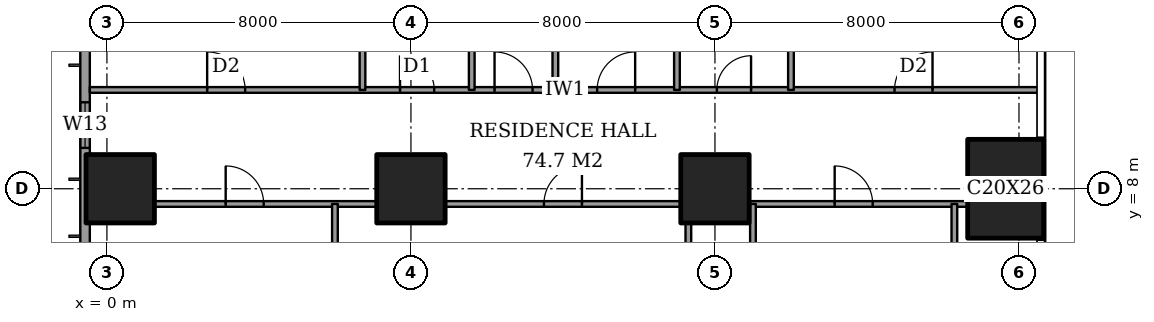
"""IFC4 building model, lengths in metres.
Left out: names, types, materials, properties, quantities, classifications, styles, units other than length and angle.
Written with IfcOpenShell. Run it as: python <this file> out.ifc"""

import sys

from ifc_helpers import new_model, si_unit, direction, frame, frame_2d, origin, origin_2d, place, context, subcontext, project, spatial, rectangle, extrude, element, fill, save


model = new_model("IFC4")
c1 = context("Model", 3, precision=1e-05, world=origin(), true_north=direction((0.0, 1.0)))
c2 = subcontext(c1, "Body", "Model", "MODEL_VIEW")
j1 = project(units=[si_unit("LENGTHUNIT", "METRE"), si_unit("PLANEANGLEUNIT", "RADIAN")], contexts=[c1])
p1 = place(None, origin())
s1 = spatial("IfcSite", under=j1, at=p1, CompositionType="ELEMENT")
p2 = place(p1, origin())
s2 = spatial("IfcBuilding", under=s1, at=p2, CompositionType="ELEMENT")
p3 = place(p2, frame((0.0, 0.0, 196.6)))
s3 = spatial("IfcBuildingStorey", under=s2, at=p3, CompositionType="ELEMENT", Elevation=196.6)
for number, where, z_axis, x_axis in (
    (1, (0.35, 8.0, 0.0), (0.0, 0.0, 1.0), (1.0, 0.0, 0.0)),
    (2, (8.0, 8.0, 0.0), (0.0, 0.0, 1.0), (1.0, 0.0, 0.0)),
    (3, (16.0, 8.0, 0.0), (0.0, 0.0, 1.0), (1.0, 0.0, 0.0)),
):
    element("IfcColumn", number, at=place(p3, frame(where, z_axis=z_axis, x_axis=x_axis)), inside=s3, PredefinedType="COLUMN", context=c2, shape_type="SweptSolid", body=[
        extrude(rectangle(XDim=1.8, YDim=1.8, at=origin_2d()), origin(), (0.0, 0.0, 1.0), 3.6),
    ])
p4 = place(p3, frame((23.65, 8.0, 0.0), z_axis=(0.0, 0.0, 1.0), x_axis=(1.0, 0.0, 0.0)))
e4 = element("IfcColumn", 4, at=p4, inside=s3, PredefinedType="COLUMN", context=c2, shape_type="SweptSolid", body=[
    extrude(rectangle(XDim=2.0, YDim=2.6, at=origin_2d()), origin(), (0.0, 0.0, 1.0), 3.6),
])
p5 = place(p3, frame((-0.575, 44.825, 0.0), z_axis=(0.0, 0.0, 1.0), x_axis=(0.0, -1.0, 0.0)))
e5 = element("IfcWall", 5, at=p5, inside=s3, PredefinedType="SOLIDWALL", context=c2, shape_type="SweptSolid", body=[
    extrude(rectangle(XDim=41.65, YDim=0.25, at=frame_2d((20.825, 0.0))), origin(), (0.0, 0.0, 1.0), 3.6),
])
p6 = place(p5, frame((0.825, 0.0, 0.2)))
e6 = element("IfcOpeningElement", 6, at=p6, cuts=e5, PredefinedType="OPENING", context=c2, shape_type="SweptSolid", body=[
    extrude(rectangle(XDim=2.4, YDim=2.4, at=frame_2d((1.2, 1.2))), frame((0.0, 0.135, 0.0), z_axis=(0.0, -1.0, 0.0), x_axis=(1.0, 0.0, 0.0)), (0.0, 0.0, 1.0), 0.27),
])
p7 = place(p5, frame((6.05, 0.0, 0.2)))
e7 = element("IfcOpeningElement", 7, at=p7, cuts=e5, PredefinedType="OPENING", context=c2, shape_type="SweptSolid", body=[
    extrude(rectangle(XDim=1.2, YDim=2.4, at=frame_2d((0.6, 1.2))), frame((0.0, 0.135, 0.0), z_axis=(0.0, -1.0, 0.0), x_axis=(1.0, 0.0, 0.0)), (0.0, 0.0, 1.0), 0.27),
])
p8 = place(p5, frame((8.225, 0.0, 0.2)))
e8 = element("IfcOpeningElement", 8, at=p8, cuts=e5, PredefinedType="OPENING", context=c2, shape_type="SweptSolid", body=[
    extrude(rectangle(XDim=2.4, YDim=2.4, at=frame_2d((1.2, 1.2))), frame((0.0, 0.135, 0.0), z_axis=(0.0, -1.0, 0.0), x_axis=(1.0, 0.0, 0.0)), (0.0, 0.0, 1.0), 0.27),
])
p9 = place(p5, frame((15.625, 0.0, 0.2)))
e9 = element("IfcOpeningElement", 9, at=p9, cuts=e5, PredefinedType="OPENING", context=c2, shape_type="SweptSolid", body=[
    extrude(rectangle(XDim=2.4, YDim=2.4, at=frame_2d((1.2, 1.2))), frame((0.0, 0.135, 0.0), z_axis=(0.0, -1.0, 0.0), x_axis=(1.0, 0.0, 0.0)), (0.0, 0.0, 1.0), 0.27),
])
p10 = place(p5, frame((23.625, 0.0, 0.2)))
e10 = element("IfcOpeningElement", 10, at=p10, cuts=e5, PredefinedType="OPENING", context=c2, shape_type="SweptSolid", body=[
    extrude(rectangle(XDim=2.4, YDim=2.4, at=frame_2d((1.2, 1.2))), frame((0.0, 0.135, 0.0), z_axis=(0.0, -1.0, 0.0), x_axis=(1.0, 0.0, 0.0)), (0.0, 0.0, 1.0), 0.27),
])
p11 = place(p5, frame((30.775, 0.0, 0.2)))
e11 = element("IfcOpeningElement", 11, at=p11, cuts=e5, PredefinedType="OPENING", context=c2, shape_type="SweptSolid", body=[
    extrude(rectangle(XDim=2.4, YDim=2.4, at=frame_2d((1.2, 1.2))), frame((0.0, 0.135, 0.0), z_axis=(0.0, -1.0, 0.0), x_axis=(1.0, 0.0, 0.0)), (0.0, 0.0, 1.0), 0.27),
])
p12 = place(p5, frame((34.55, 0.0, 0.2)))
e12 = element("IfcOpeningElement", 12, at=p12, cuts=e5, PredefinedType="OPENING", context=c2, shape_type="SweptSolid", body=[
    extrude(rectangle(XDim=1.2, YDim=2.4, at=frame_2d((0.6, 1.2))), frame((0.0, 0.135, 0.0), z_axis=(0.0, -1.0, 0.0), x_axis=(1.0, 0.0, 0.0)), (0.0, 0.0, 1.0), 0.27),
])
p13 = place(p5, frame((38.425, 0.0, 0.2)))
e13 = element("IfcOpeningElement", 13, at=p13, cuts=e5, PredefinedType="OPENING", context=c2, shape_type="SweptSolid", body=[
    extrude(rectangle(XDim=2.4, YDim=2.4, at=frame_2d((1.2, 1.2))), frame((0.0, 0.135, 0.0), z_axis=(0.0, -1.0, 0.0), x_axis=(1.0, 0.0, 0.0)), (0.0, 0.0, 1.0), 0.27),
])
p14 = place(p3, frame((1.25, 7.6, 0.0), z_axis=(0.0, 0.0, 1.0), x_axis=(1.0, 0.0, 0.0)))
e14 = element("IfcWall", 14, at=p14, inside=s3, PredefinedType="PARTITIONING", context=c2, shape_type="SweptSolid", body=[
    extrude(rectangle(XDim=5.85, YDim=0.15, at=frame_2d((2.925, 0.0))), origin(), (0.0, 0.0, 1.0), 3.35),
])
p15 = place(p14, frame((1.875, 0.0, 0.0)))
e15 = element("IfcOpeningElement", 15, at=p15, cuts=e14, PredefinedType="OPENING", context=c2, shape_type="SweptSolid", body=[
    extrude(rectangle(XDim=1.0, YDim=2.1, at=frame_2d((0.5, 1.05))), frame((0.0, 0.085, 0.0), z_axis=(0.0, -1.0, 0.0), x_axis=(1.0, 0.0, 0.0)), (0.0, 0.0, 1.0), 0.17),
])
p16 = place(p3, frame((8.9, 7.6, 0.0), z_axis=(0.0, 0.0, 1.0), x_axis=(1.0, 0.0, 0.0)))
e16 = element("IfcWall", 16, at=p16, inside=s3, PredefinedType="PARTITIONING", context=c2, shape_type="SweptSolid", body=[
    extrude(rectangle(XDim=6.2, YDim=0.15, at=frame_2d((3.1, 0.0))), origin(), (0.0, 0.0, 1.0), 3.35),
])
p17 = place(p16, frame((2.6, 0.0, 0.0)))
e17 = element("IfcOpeningElement", 17, at=p17, cuts=e16, PredefinedType="OPENING", context=c2, shape_type="SweptSolid", body=[
    extrude(rectangle(XDim=1.0, YDim=2.1, at=frame_2d((0.5, 1.05))), frame((0.0, 0.085, 0.0), z_axis=(0.0, -1.0, 0.0), x_axis=(1.0, 0.0, 0.0)), (0.0, 0.0, 1.0), 0.17),
])
p18 = place(p3, frame((16.9, 7.6, 0.0), z_axis=(0.0, 0.0, 1.0), x_axis=(1.0, 0.0, 0.0)))
e18 = element("IfcWall", 18, at=p18, inside=s3, PredefinedType="PARTITIONING", context=c2, shape_type="SweptSolid", body=[
    extrude(rectangle(XDim=5.75, YDim=0.15, at=frame_2d((2.875, 0.0))), origin(), (0.0, 0.0, 1.0), 3.35),
])
p19 = place(p18, frame((2.25, 0.0, 0.0)))
e19 = element("IfcOpeningElement", 19, at=p19, cuts=e18, PredefinedType="OPENING", context=c2, shape_type="SweptSolid", body=[
    extrude(rectangle(XDim=1.0, YDim=2.1, at=frame_2d((0.5, 1.05))), frame((0.0, 0.085, 0.0), z_axis=(0.0, -1.0, 0.0), x_axis=(1.0, 0.0, 0.0)), (0.0, 0.0, 1.0), 0.17),
])
p20 = place(p3, frame((-0.45, 10.6, 0.0), z_axis=(0.0, 0.0, 1.0), x_axis=(1.0, 0.0, 0.0)))
e20 = element("IfcWall", 20, at=p20, inside=s3, PredefinedType="PARTITIONING", context=c2, shape_type="SweptSolid", body=[
    extrude(rectangle(XDim=25.011, YDim=0.15, at=frame_2d((12.505, 0.0))), origin(), (0.0, 0.0, 1.0), 3.35),
])
p21 = place(p20, frame((10.65, 0.0, 0.0)))
e21 = element("IfcOpeningElement", 21, at=p21, cuts=e20, PredefinedType="OPENING", context=c2, shape_type="SweptSolid", body=[
    extrude(rectangle(XDim=1.0, YDim=2.1, at=frame_2d((0.5, 1.05))), frame((0.0, 0.085, 0.0), z_axis=(0.0, -1.0, 0.0), x_axis=(1.0, 0.0, 0.0)), (0.0, 0.0, 1.0), 0.17),
])
p22 = place(p20, frame((3.087, 0.0, 0.0)))
e22 = element("IfcOpeningElement", 22, at=p22, cuts=e20, PredefinedType="OPENING", context=c2, shape_type="SweptSolid", body=[
    extrude(rectangle(XDim=1.0, YDim=2.1, at=frame_2d((0.5, 1.05))), frame((0.0, 0.085, 0.0), z_axis=(0.0, -1.0, 0.0), x_axis=(1.0, 0.0, 0.0)), (0.0, 0.0, 1.0), 0.17),
])
p23 = place(p20, frame((8.163, 0.0, 0.0)))
e23 = element("IfcOpeningElement", 23, at=p23, cuts=e20, PredefinedType="OPENING", context=c2, shape_type="SweptSolid", body=[
    extrude(rectangle(XDim=0.9, YDim=2.1, at=frame_2d((0.45, 1.05))), frame((0.0, 0.085, 0.0), z_axis=(0.0, -1.0, 0.0), x_axis=(1.0, 0.0, 0.0)), (0.0, 0.0, 1.0), 0.17),
])
p24 = place(p20, frame((13.35, 0.0, 0.0)))
e24 = element("IfcOpeningElement", 24, at=p24, cuts=e20, PredefinedType="OPENING", context=c2, shape_type="SweptSolid", body=[
    extrude(rectangle(XDim=1.0, YDim=2.1, at=frame_2d((0.5, 1.05))), frame((0.0, 0.085, 0.0), z_axis=(0.0, -1.0, 0.0), x_axis=(1.0, 0.0, 0.0)), (0.0, 0.0, 1.0), 0.17),
])
p25 = place(p20, frame((16.5, 0.0, 0.0)))
e25 = element("IfcOpeningElement", 25, at=p25, cuts=e20, PredefinedType="OPENING", context=c2, shape_type="SweptSolid", body=[
    extrude(rectangle(XDim=0.9, YDim=2.1, at=frame_2d((0.45, 1.05))), frame((0.0, 0.085, 0.0), z_axis=(0.0, -1.0, 0.0), x_axis=(1.0, 0.0, 0.0)), (0.0, 0.0, 1.0), 0.17),
])
p26 = place(p20, frame((21.175, 0.0, 0.0)))
e26 = element("IfcOpeningElement", 26, at=p26, cuts=e20, PredefinedType="OPENING", context=c2, shape_type="SweptSolid", body=[
    extrude(rectangle(XDim=1.0, YDim=2.1, at=frame_2d((0.5, 1.05))), frame((0.0, 0.085, 0.0), z_axis=(0.0, -1.0, 0.0), x_axis=(1.0, 0.0, 0.0)), (0.0, 0.0, 1.0), 0.17),
])
p27 = place(p3, frame((6.0, -0.45, 0.0), z_axis=(0.0, 0.0, 1.0), x_axis=(0.0, 1.0, 0.0)))
e27 = element("IfcWall", 27, at=p27, inside=s3, PredefinedType="PARTITIONING", context=c2, shape_type="SweptSolid", body=[
    extrude(rectangle(XDim=8.05, YDim=0.15, at=frame_2d((4.025, 0.0))), origin(), (0.0, 0.0, 1.0), 3.35),
])
p28 = place(p3, frame((6.725, 10.6, 0.0), z_axis=(0.0, 0.0, 1.0), x_axis=(0.0, 1.0, 0.0)))
e28 = element("IfcWall", 28, at=p28, inside=s3, PredefinedType="PARTITIONING", context=c2, shape_type="SweptSolid", body=[
    extrude(rectangle(XDim=4.2, YDim=0.15, at=frame_2d((2.1, 0.0))), origin(), (0.0, 0.0, 1.0), 3.35),
])
p29 = place(p3, frame((9.6, 10.6, 0.0), z_axis=(0.0, 0.0, 1.0), x_axis=(0.0, 1.0, 0.0)))
e29 = element("IfcWall", 29, at=p29, inside=s3, PredefinedType="PARTITIONING", context=c2, shape_type="SweptSolid", body=[
    extrude(rectangle(XDim=11.0, YDim=0.15, at=frame_2d((5.5, 0.0))), origin(), (0.0, 0.0, 1.0), 3.35),
])
p30 = place(p29, frame((8.7, 0.0, 0.0)))
e30 = element("IfcOpeningElement", 30, at=p30, cuts=e29, PredefinedType="OPENING", context=c2, shape_type="SweptSolid", body=[
    extrude(rectangle(XDim=1.0, YDim=2.1, at=frame_2d((0.5, 1.05))), frame((0.0, 0.085, 0.0), z_axis=(0.0, -1.0, 0.0), x_axis=(1.0, 0.0, 0.0)), (0.0, 0.0, 1.0), 0.17),
])
p31 = place(p3, frame((11.8, 10.6, 0.0), z_axis=(0.0, 0.0, 1.0), x_axis=(0.0, 1.0, 0.0)))
e31 = element("IfcWall", 31, at=p31, inside=s3, PredefinedType="PARTITIONING", context=c2, shape_type="SweptSolid", body=[
    extrude(rectangle(XDim=7.4, YDim=0.15, at=frame_2d((3.7, 0.0))), origin(), (0.0, 0.0, 1.0), 3.35),
])
p32 = place(p3, frame((15.0, 10.6, 0.0), z_axis=(0.0, 0.0, 1.0), x_axis=(0.0, 1.0, 0.0)))
e32 = element("IfcWall", 32, at=p32, inside=s3, PredefinedType="PARTITIONING", context=c2, shape_type="SweptSolid", body=[
    extrude(rectangle(XDim=4.2, YDim=0.15, at=frame_2d((2.1, 0.0))), origin(), (0.0, 0.0, 1.0), 3.35),
])
p33 = place(p3, frame((15.3, 1.25, 0.0), z_axis=(0.0, 0.0, 1.0), x_axis=(0.0, 1.0, 0.0)))
e33 = element("IfcWall", 33, at=p33, inside=s3, PredefinedType="PARTITIONING", context=c2, shape_type="SweptSolid", body=[
    extrude(rectangle(XDim=5.85, YDim=0.15, at=frame_2d((2.925, 0.0))), origin(), (0.0, 0.0, 1.0), 3.35),
])
p34 = place(p33, frame((2.475, 0.0, 0.0)))
e34 = element("IfcOpeningElement", 34, at=p34, cuts=e33, PredefinedType="OPENING", context=c2, shape_type="SweptSolid", body=[
    extrude(rectangle(XDim=0.9, YDim=2.1, at=frame_2d((0.45, 1.05))), frame((0.0, 0.085, 0.0), z_axis=(0.0, -1.0, 0.0), x_axis=(1.0, 0.0, 0.0)), (0.0, 0.0, 1.0), 0.17),
])
p35 = place(p3, frame((17.0, -0.45, 0.0), z_axis=(0.0, 0.0, 1.0), x_axis=(0.0, 1.0, 0.0)))
e35 = element("IfcWall", 35, at=p35, inside=s3, PredefinedType="PARTITIONING", context=c2, shape_type="SweptSolid", body=[
    extrude(rectangle(XDim=8.05, YDim=0.15, at=frame_2d((4.025, 0.0))), origin(), (0.0, 0.0, 1.0), 3.35),
])
p36 = place(p3, frame((18.0, 10.6, 0.0), z_axis=(0.0, 0.0, 1.0), x_axis=(0.0, 1.0, 0.0)))
e36 = element("IfcWall", 36, at=p36, inside=s3, PredefinedType="PARTITIONING", context=c2, shape_type="SweptSolid", body=[
    extrude(rectangle(XDim=7.4, YDim=0.15, at=frame_2d((3.7, 0.0))), origin(), (0.0, 0.0, 1.0), 3.35),
])
p37 = place(p3, frame((22.3, -0.45, 0.0), z_axis=(0.0, 0.0, 1.0), x_axis=(0.0, 1.0, 0.0)))
e37 = element("IfcWall", 37, at=p37, inside=s3, PredefinedType="PARTITIONING", context=c2, shape_type="SweptSolid", body=[
    extrude(rectangle(XDim=8.05, YDim=0.15, at=frame_2d((4.025, 0.0))), origin(), (0.0, 0.0, 1.0), 3.35),
])
p38 = place(p37, frame((3.575, 0.0, 0.0)))
e38 = element("IfcOpeningElement", 38, at=p38, cuts=e37, PredefinedType="OPENING", context=c2, shape_type="SweptSolid", body=[
    extrude(rectangle(XDim=0.9, YDim=2.1, at=frame_2d((0.45, 1.05))), frame((0.0, 0.085, 0.0), z_axis=(0.0, -1.0, 0.0), x_axis=(1.0, 0.0, 0.0)), (0.0, 0.0, 1.0), 0.17),
])
p39 = place(p12, origin())
e39 = element("IfcWindow", 39, at=p39, inside=s3, PartitioningType="SINGLE_PANEL", PredefinedType="WINDOW", context=c2, shape_type="SweptSolid", body=[
    extrude(rectangle(XDim=1.2, YDim=2.4, at=frame_2d((0.6, 1.2))), frame((0.0, 0.03, 0.0), z_axis=(0.0, -1.0, 0.0), x_axis=(1.0, 0.0, 0.0)), (0.0, 0.0, 1.0), 0.06),
])
fill(e12, e39)
p40 = place(p15, origin())
e40 = element("IfcDoor", 40, at=p40, inside=s3, OperationType="SINGLE_SWING_RIGHT", PredefinedType="DOOR", context=c2, shape_type="SweptSolid", body=[
    extrude(rectangle(XDim=1.0, YDim=2.1, at=frame_2d((0.5, 1.05))), frame((0.0, 0.025, 0.0), z_axis=(0.0, -1.0, 0.0), x_axis=(1.0, 0.0, 0.0)), (0.0, 0.0, 1.0), 0.05),
])
fill(e15, e40)
p41 = place(p17, origin())
e41 = element("IfcDoor", 41, at=p41, inside=s3, OperationType="SINGLE_SWING_LEFT", PredefinedType="DOOR", context=c2, shape_type="SweptSolid", body=[
    extrude(rectangle(XDim=1.0, YDim=2.1, at=frame_2d((0.5, 1.05))), frame((0.0, 0.025, 0.0), z_axis=(0.0, -1.0, 0.0), x_axis=(1.0, 0.0, 0.0)), (0.0, 0.0, 1.0), 0.05),
])
fill(e17, e41)
p42 = place(p19, origin())
e42 = element("IfcDoor", 42, at=p42, inside=s3, OperationType="SINGLE_SWING_RIGHT", PredefinedType="DOOR", context=c2, shape_type="SweptSolid", body=[
    extrude(rectangle(XDim=1.0, YDim=2.1, at=frame_2d((0.5, 1.05))), frame((0.0, 0.025, 0.0), z_axis=(0.0, -1.0, 0.0), x_axis=(1.0, 0.0, 0.0)), (0.0, 0.0, 1.0), 0.05),
])
fill(e19, e42)
p43 = place(p21, origin())
e43 = element("IfcDoor", 43, at=p43, inside=s3, OperationType="SINGLE_SWING_RIGHT", PredefinedType="DOOR", context=c2, shape_type="SweptSolid", body=[
    extrude(rectangle(XDim=1.0, YDim=2.1, at=frame_2d((0.5, 1.05))), frame((0.0, 0.025, 0.0), z_axis=(0.0, -1.0, 0.0), x_axis=(1.0, 0.0, 0.0)), (0.0, 0.0, 1.0), 0.05),
])
fill(e21, e43)
p44 = place(p22, origin())
e44 = element("IfcDoor", 44, at=p44, inside=s3, OperationType="SINGLE_SWING_RIGHT", PredefinedType="DOOR", context=c2, shape_type="SweptSolid", body=[
    extrude(rectangle(XDim=1.0, YDim=2.1, at=frame_2d((0.5, 1.05))), frame((0.0, 0.025, 0.0), z_axis=(0.0, -1.0, 0.0), x_axis=(1.0, 0.0, 0.0)), (0.0, 0.0, 1.0), 0.05),
])
fill(e22, e44)
p45 = place(p23, origin())
e45 = element("IfcDoor", 45, at=p45, inside=s3, OperationType="SINGLE_SWING_RIGHT", PredefinedType="DOOR", context=c2, shape_type="SweptSolid", body=[
    extrude(rectangle(XDim=0.9, YDim=2.1, at=frame_2d((0.45, 1.05))), frame((0.0, 0.025, 0.0), z_axis=(0.0, -1.0, 0.0), x_axis=(1.0, 0.0, 0.0)), (0.0, 0.0, 1.0), 0.05),
])
fill(e23, e45)
p46 = place(p24, origin())
e46 = element("IfcDoor", 46, at=p46, inside=s3, OperationType="SINGLE_SWING_LEFT", PredefinedType="DOOR", context=c2, shape_type="SweptSolid", body=[
    extrude(rectangle(XDim=1.0, YDim=2.1, at=frame_2d((0.5, 1.05))), frame((0.0, 0.025, 0.0), z_axis=(0.0, -1.0, 0.0), x_axis=(1.0, 0.0, 0.0)), (0.0, 0.0, 1.0), 0.05),
])
fill(e24, e46)
p47 = place(p25, origin())
e47 = element("IfcDoor", 47, at=p47, inside=s3, OperationType="SINGLE_SWING_LEFT", PredefinedType="DOOR", context=c2, shape_type="SweptSolid", body=[
    extrude(rectangle(XDim=0.9, YDim=2.1, at=frame_2d((0.45, 1.05))), frame((0.0, 0.025, 0.0), z_axis=(0.0, -1.0, 0.0), x_axis=(1.0, 0.0, 0.0)), (0.0, 0.0, 1.0), 0.05),
])
fill(e25, e47)
p48 = place(p26, origin())
e48 = element("IfcDoor", 48, at=p48, inside=s3, OperationType="SINGLE_SWING_LEFT", PredefinedType="DOOR", context=c2, shape_type="SweptSolid", body=[
    extrude(rectangle(XDim=1.0, YDim=2.1, at=frame_2d((0.5, 1.05))), frame((0.0, 0.025, 0.0), z_axis=(0.0, -1.0, 0.0), x_axis=(1.0, 0.0, 0.0)), (0.0, 0.0, 1.0), 0.05),
])
fill(e26, e48)
save(model, sys.argv[1])
